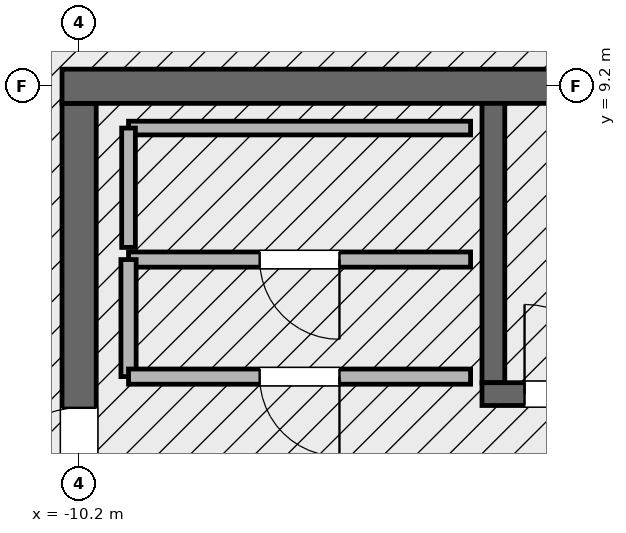
"""IFC4 building model, lengths in metres.
Left out: names, types, materials, properties, quantities, classifications, styles, units other than length and angle.
Written with IfcOpenShell. Run it as: python <this file> out.ifc"""

import sys

from ifc_helpers import new_model, si_unit, direction, frame, frame_2d, origin, place, context, subcontext, project, spatial, rectangle, extrude, element, fill, save


model = new_model("IFC4")
c1 = context("Model", 3, precision=1e-05, world=origin(), true_north=direction((0.0, 1.0)))
c2 = subcontext(c1, "Body", "Model", "MODEL_VIEW")
j1 = project(units=[si_unit("LENGTHUNIT", "METRE"), si_unit("PLANEANGLEUNIT", "RADIAN")], contexts=[c1])
p1 = place(None, origin())
s1 = spatial("IfcSite", under=j1, at=p1, CompositionType="ELEMENT")
p2 = place(p1, origin())
s2 = spatial("IfcBuilding", under=s1, at=p2, CompositionType="ELEMENT")
p3 = place(p2, frame((0.0, 0.0, 334.2)))
s3 = spatial("IfcBuildingStorey", under=s2, at=p3, CompositionType="ELEMENT", Elevation=334.2)
p4 = place(p3, frame((-10.2, -8.975, 0.0), z_axis=(0.0, 0.0, 1.0), x_axis=(0.0, 1.0, 0.0)))
e1 = element("IfcWall", 1, at=p4, inside=s3, PredefinedType="SHEAR", context=c2, shape_type="SweptSolid", body=[
    extrude(rectangle(XDim=17.95, YDim=0.45, at=frame_2d((8.975, 0.0))), origin(), (0.0, 0.0, 1.0), 4.8),
])
p5 = place(p4, frame((12.765, 0.0, 0.0)))
e2 = element("IfcOpeningElement", 2, at=p5, cuts=e1, PredefinedType="OPENING", context=c2, shape_type="SweptSolid", body=[
    extrude(rectangle(XDim=1.18, YDim=2.2, at=frame_2d((0.59, 1.1))), frame((0.0, 0.235, 0.0), z_axis=(0.0, -1.0, 0.0), x_axis=(1.0, 0.0, 0.0)), (0.0, 0.0, 1.0), 0.47),
])
p6 = place(p3, frame((-10.425, 9.2, 0.0), z_axis=(0.0, 0.0, 1.0), x_axis=(1.0, 0.0, 0.0)))
e3 = element("IfcWall", 3, at=p6, inside=s3, PredefinedType="SHEAR", context=c2, shape_type="SweptSolid", body=[
    extrude(rectangle(XDim=20.85, YDim=0.45, at=frame_2d((10.425, 0.0))), origin(), (0.0, 0.0, 1.0), 4.8),
])
p7 = place(p3, frame((-4.75, 5.3, 0.0), z_axis=(0.0, 0.0, 1.0), x_axis=(0.0, 1.0, 0.0)))
e4 = element("IfcWall", 4, at=p7, inside=s3, PredefinedType="SOLIDWALL", context=c2, shape_type="SweptSolid", body=[
    extrude(rectangle(XDim=3.675, YDim=0.3, at=frame_2d((1.837, 0.0))), origin(), (0.0, 0.0, 1.0), 4.8),
])
p8 = place(p3, frame((-4.9, 5.15, 0.0), z_axis=(0.0, 0.0, 1.0), x_axis=(1.0, 0.0, 0.0)))
e5 = element("IfcWall", 5, at=p8, inside=s3, PredefinedType="SOLIDWALL", context=c2, shape_type="SweptSolid", body=[
    extrude(rectangle(XDim=9.8, YDim=0.3, at=frame_2d((4.9, 0.0))), origin(), (0.0, 0.0, 1.0), 4.8),
])
p9 = place(p8, frame((0.56, 0.0, 0.0)))
e6 = element("IfcOpeningElement", 6, at=p9, cuts=e5, PredefinedType="OPENING", context=c2, shape_type="SweptSolid", body=[
    extrude(rectangle(XDim=1.18, YDim=2.2, at=frame_2d((0.59, 1.1))), frame((0.0, 0.16, 0.0), z_axis=(0.0, -1.0, 0.0), x_axis=(1.0, 0.0, 0.0)), (0.0, 0.0, 1.0), 0.32),
])
p10 = place(p3, frame((-5.05, 6.92, 0.0), z_axis=(0.0, 0.0, 1.0), x_axis=(-1.0, 0.0, 0.0)))
e7 = element("IfcWall", 7, at=p10, inside=s3, PredefinedType="SOLIDWALL", context=c2, shape_type="SweptSolid", body=[
    extrude(rectangle(XDim=4.5, YDim=0.2, at=frame_2d((2.25, 0.0))), origin(), (0.0, 0.0, 1.0), 4.54),
])
p11 = place(p10, frame((1.725, 0.0, 0.0)))
e8 = element("IfcOpeningElement", 8, at=p11, cuts=e7, PredefinedType="OPENING", context=c2, shape_type="SweptSolid", body=[
    extrude(rectangle(XDim=1.05, YDim=2.2, at=frame_2d((0.525, 1.1))), frame((0.0, 0.11, 0.0), z_axis=(0.0, -1.0, 0.0), x_axis=(1.0, 0.0, 0.0)), (0.0, 0.0, 1.0), 0.22),
])
p12 = place(p3, frame((-9.55, 6.92, 0.0), z_axis=(0.0, 0.0, 1.0), x_axis=(0.0, -1.0, 0.0)))
e9 = element("IfcWall", 9, at=p12, inside=s3, PredefinedType="SOLIDWALL", context=c2, shape_type="SweptSolid", body=[
    extrude(rectangle(XDim=1.54, YDim=0.2, at=frame_2d((0.77, 0.0))), origin(), (0.0, 0.0, 1.0), 4.54),
])
p13 = place(p3, frame((-9.55, 5.38, 0.0), z_axis=(0.0, 0.0, 1.0), x_axis=(1.0, 0.0, 0.0)))
e10 = element("IfcWall", 10, at=p13, inside=s3, PredefinedType="SOLIDWALL", context=c2, shape_type="SweptSolid", body=[
    extrude(rectangle(XDim=4.5, YDim=0.2, at=frame_2d((2.25, 0.0))), origin(), (0.0, 0.0, 1.0), 4.54),
])
p14 = place(p13, frame((1.725, 0.0, 0.0)))
e11 = element("IfcOpeningElement", 11, at=p14, cuts=e10, PredefinedType="OPENING", context=c2, shape_type="SweptSolid", body=[
    extrude(rectangle(XDim=1.05, YDim=2.2, at=frame_2d((0.525, 1.1))), frame((0.0, 0.11, 0.0), z_axis=(0.0, -1.0, 0.0), x_axis=(1.0, 0.0, 0.0)), (0.0, 0.0, 1.0), 0.22),
])
p15 = place(p3, frame((-5.05, 8.65, 0.0), z_axis=(0.0, 0.0, 1.0), x_axis=(-1.0, 0.0, 0.0)))
e12 = element("IfcWall", 12, at=p15, inside=s3, PredefinedType="PARTITIONING", context=c2, shape_type="SweptSolid", body=[
    extrude(rectangle(XDim=4.5, YDim=0.18, at=frame_2d((2.25, 0.0))), origin(), (0.0, 0.0, 1.0), 4.54),
])
p16 = place(p3, frame((-9.55, 8.65, 0.0), z_axis=(0.0, 0.0, 1.0), x_axis=(0.0, -1.0, 0.0)))
e13 = element("IfcWall", 13, at=p16, inside=s3, PredefinedType="PARTITIONING", context=c2, shape_type="SweptSolid", body=[
    extrude(rectangle(XDim=1.57, YDim=0.18, at=frame_2d((0.785, 0.0))), origin(), (0.0, 0.0, 1.0), 4.54),
])
p17 = place(p9, origin())
e14 = element("IfcDoor", 14, at=p17, inside=s3, OperationType="SINGLE_SWING_LEFT", PredefinedType="DOOR", context=c2, shape_type="SweptSolid", body=[
    extrude(rectangle(XDim=1.18, YDim=2.2, at=frame_2d((0.59, 1.1))), frame((0.0, 0.025, 0.0), z_axis=(0.0, -1.0, 0.0), x_axis=(1.0, 0.0, 0.0)), (0.0, 0.0, 1.0), 0.05),
])
fill(e6, e14)
p18 = place(p5, origin())
e15 = element("IfcDoor", 15, at=p18, inside=s3, OperationType="SINGLE_SWING_LEFT", PredefinedType="DOOR", context=c2, shape_type="SweptSolid", body=[
    extrude(rectangle(XDim=1.18, YDim=2.2, at=frame_2d((0.59, 1.1))), frame((0.0, 0.025, 0.0), z_axis=(0.0, -1.0, 0.0), x_axis=(1.0, 0.0, 0.0)), (0.0, 0.0, 1.0), 0.05),
])
fill(e2, e15)
p19 = place(p14, origin())
e16 = element("IfcDoor", 16, at=p19, inside=s3, OperationType="SINGLE_SWING_RIGHT", PredefinedType="DOOR", context=c2, shape_type="SweptSolid", body=[
    extrude(rectangle(XDim=1.05, YDim=2.2, at=frame_2d((0.525, 1.1))), frame((0.0, 0.025, 0.0), z_axis=(0.0, -1.0, 0.0), x_axis=(1.0, 0.0, 0.0)), (0.0, 0.0, 1.0), 0.05),
])
fill(e11, e16)
p20 = place(p11, origin())
e17 = element("IfcDoor", 17, at=p20, inside=s3, OperationType="SINGLE_SWING_LEFT", PredefinedType="DOOR", context=c2, shape_type="SweptSolid", body=[
    extrude(rectangle(XDim=1.05, YDim=2.2, at=frame_2d((0.525, 1.1))), frame((0.0, 0.025, 0.0), z_axis=(0.0, -1.0, 0.0), x_axis=(1.0, 0.0, 0.0)), (0.0, 0.0, 1.0), 0.05),
])
fill(e8, e17)
save(model, sys.argv[1])
